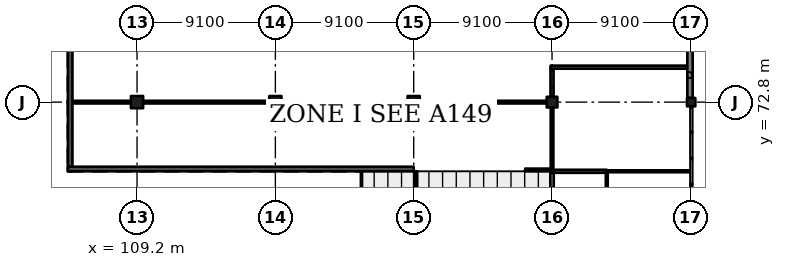
"""IFC4 building model, lengths in metres.
Left out: names, types, materials, properties, quantities, classifications, styles, units other than length and angle.
Written with IfcOpenShell. Run it as: python <this file> out.ifc"""

import sys

from ifc_helpers import new_model, si_unit, direction, frame, frame_2d, origin, origin_2d, place, context, subcontext, project, spatial, rectangle, extrude, element, fill, save


model = new_model("IFC4")
c1 = context("Model", 3, precision=1e-05, world=origin(), true_north=direction((0.0, 1.0)))
c2 = subcontext(c1, "Body", "Model", "MODEL_VIEW")
j1 = project(units=[si_unit("LENGTHUNIT", "METRE"), si_unit("PLANEANGLEUNIT", "RADIAN")], contexts=[c1])
p1 = place(None, origin())
s1 = spatial("IfcSite", under=j1, at=p1, CompositionType="ELEMENT")
p2 = place(p1, origin())
s2 = spatial("IfcBuilding", under=s1, at=p2, CompositionType="ELEMENT")
p3 = place(p2, frame((0.0, 0.0, 15.47)))
s3 = spatial("IfcBuildingStorey", under=s2, at=p3, CompositionType="ELEMENT", Elevation=15.47)
for number, where, z_axis, x_axis in (
    (1, (109.2, 72.8, 0.0), (0.0, 0.0, 1.0), (1.0, 0.0, 0.0)),
    (2, (118.3, 72.8, 0.0), (0.0, 0.0, 1.0), (1.0, 0.0, 0.0)),
    (3, (127.4, 72.8, 0.0), (0.0, 0.0, 1.0), (1.0, 0.0, 0.0)),
):
    element("IfcColumn", number, at=place(p3, frame(where, z_axis=z_axis, x_axis=x_axis)), inside=s3, PredefinedType="COLUMN", context=c2, shape_type="SweptSolid", body=[
        extrude(rectangle(XDim=0.8, YDim=0.8, at=origin_2d()), origin(), (0.0, 0.0, 1.0), 4.55),
    ])
p4 = place(p3, frame((136.5, 72.8, 0.0), z_axis=(0.0, 0.0, 1.0), x_axis=(1.0, 0.0, 0.0)))
e4 = element("IfcColumn", 4, at=p4, inside=s3, PredefinedType="COLUMN", context=c2, shape_type="SweptSolid", body=[
    extrude(rectangle(XDim=0.7, YDim=0.7, at=origin_2d()), origin(), (0.0, 0.0, 1.0), 4.55),
])
p5 = place(p3, frame((145.65, 72.8, 0.0), z_axis=(0.0, 0.0, 1.0), x_axis=(1.0, 0.0, 0.0)))
e5 = element("IfcColumn", 5, at=p5, inside=s3, PredefinedType="COLUMN", context=c2, shape_type="SweptSolid", body=[
    extrude(rectangle(XDim=0.55, YDim=0.55, at=origin_2d()), origin(), (0.0, 0.0, 1.0), 4.55),
])
for number, where, z_axis, x_axis in (
    (6, (104.8, 68.25, 0.0), (0.0, 0.0, 1.0), (0.0, 1.0, 0.0)),
    (7, (104.65, 68.4, 0.0), (0.0, 0.0, 1.0), (1.0, 0.0, 0.0)),
):
    element("IfcWall", number, at=place(p3, frame(where, z_axis=z_axis, x_axis=x_axis)), inside=s3, PredefinedType="SHEAR", context=c2, shape_type="SweptSolid", body=[
        extrude(rectangle(XDim=22.75, YDim=0.3, at=frame_2d((11.375, 0.0))), origin(), (0.0, 0.0, 1.0), 4.55),
    ])
p6 = place(p3, frame((145.575, 73.075, 0.0), z_axis=(0.0, 0.0, 1.0), x_axis=(0.0, 1.0, 0.0)))
e8 = element("IfcWall", 8, at=p6, inside=s3, PredefinedType="SOLIDWALL", context=c2, shape_type="SweptSolid", body=[
    extrude(rectangle(XDim=8.575, YDim=0.35, at=frame_2d((4.288, 0.0))), origin(), (0.0, 0.0, 1.0), 3.55),
])
p7 = place(p3, frame((104.95, 72.8, 0.0), z_axis=(0.0, 0.0, 1.0), x_axis=(1.0, 0.0, 0.0)))
e9 = element("IfcWall", 9, at=p7, inside=s3, PredefinedType="PARTITIONING", context=c2, shape_type="SweptSolid", body=[
    extrude(rectangle(XDim=3.85, YDim=0.175, at=frame_2d((1.925, 0.0))), origin(), (0.0, 0.0, 1.0), 4.3),
])
p8 = place(p3, frame((109.6, 72.8, 0.0), z_axis=(0.0, 0.0, 1.0), x_axis=(1.0, 0.0, 0.0)))
e10 = element("IfcWall", 10, at=p8, inside=s3, PredefinedType="PARTITIONING", context=c2, shape_type="SweptSolid", body=[
    extrude(rectangle(XDim=8.3, YDim=0.175, at=frame_2d((4.15, 0.0))), origin(), (0.0, 0.0, 1.0), 3.6),
])
p9 = place(p3, frame((118.7, 72.8, 0.0), z_axis=(0.0, 0.0, 1.0), x_axis=(1.0, 0.0, 0.0)))
e11 = element("IfcWall", 11, at=p9, inside=s3, PredefinedType="PARTITIONING", context=c2, shape_type="SweptSolid", body=[
    extrude(rectangle(XDim=8.3, YDim=0.175, at=frame_2d((4.15, 0.0))), origin(), (0.0, 0.0, 1.0), 3.6),
])
p10 = place(p3, frame((127.8, 72.8, 0.0), z_axis=(0.0, 0.0, 1.0), x_axis=(1.0, 0.0, 0.0)))
e12 = element("IfcWall", 12, at=p10, inside=s3, PredefinedType="PARTITIONING", context=c2, shape_type="SweptSolid", body=[
    extrude(rectangle(XDim=8.35, YDim=0.175, at=frame_2d((4.175, 0.0))), origin(), (0.0, 0.0, 1.0), 3.6),
])
p11 = place(p10, frame((3.65, 0.0, 0.0)))
e13 = element("IfcOpeningElement", 13, at=p11, cuts=e12, PredefinedType="OPENING", context=c2, shape_type="SweptSolid", body=[
    extrude(rectangle(XDim=1.1, YDim=2.4, at=frame_2d((0.55, 1.2))), frame((0.0, 0.097, 0.0), z_axis=(0.0, -1.0, 0.0), x_axis=(1.0, 0.0, 0.0)), (0.0, 0.0, 1.0), 0.195),
])
p12 = place(p3, frame((136.5, 64.025, 0.0), z_axis=(0.0, 0.0, 1.0), x_axis=(0.0, 1.0, 0.0)))
e14 = element("IfcWall", 14, at=p12, inside=s3, PredefinedType="PARTITIONING", context=c2, shape_type="SweptSolid", body=[
    extrude(rectangle(XDim=4.125, YDim=0.225, at=frame_2d((2.062, 0.0))), origin(), (0.0, 0.0, 1.0), 3.55),
])
p13 = place(p3, frame((136.5, 68.338, 0.0), z_axis=(0.0, 0.0, 1.0), x_axis=(-1.0, 0.0, 0.0)))
e15 = element("IfcWall", 15, at=p13, inside=s3, PredefinedType="PARTITIONING", context=c2, shape_type="SweptSolid", body=[
    extrude(rectangle(XDim=1.77, YDim=0.175, at=frame_2d((0.885, 0.0))), origin(), (0.0, 0.0, 1.0), 4.3),
])
p14 = place(p3, frame((136.5, 72.45, 0.0), z_axis=(0.0, 0.0, 1.0), x_axis=(0.0, -1.0, 0.0)))
e16 = element("IfcWall", 16, at=p14, inside=s3, PredefinedType="PARTITIONING", context=c2, shape_type="SweptSolid", body=[
    extrude(rectangle(XDim=4.1, YDim=0.175, at=frame_2d((2.05, 0.0))), origin(), (0.0, 0.0, 1.0), 3.55),
])
p15 = place(p3, frame((136.5, 75.0, 0.0), z_axis=(0.0, 0.0, 1.0), x_axis=(0.0, -1.0, 0.0)))
e17 = element("IfcWall", 17, at=p15, inside=s3, PredefinedType="PARTITIONING", context=c2, shape_type="SweptSolid", body=[
    extrude(rectangle(XDim=1.85, YDim=0.2, at=frame_2d((0.925, 0.0))), origin(), (0.0, 0.0, 1.0), 3.55),
])
p16 = place(p3, frame((140.1, 54.6, 0.0), z_axis=(0.0, 0.0, 1.0), x_axis=(0.0, 1.0, 0.0)))
e18 = element("IfcWall", 18, at=p16, inside=s3, PredefinedType="PARTITIONING", context=c2, shape_type="SweptSolid", body=[
    extrude(rectangle(XDim=13.55, YDim=0.125, at=frame_2d((6.775, 0.0))), origin(), (0.0, 0.0, 1.0), 4.3),
])
p17 = place(p16, frame((4.05, 0.0, 0.0)))
e19 = element("IfcOpeningElement", 19, at=p17, cuts=e18, PredefinedType="OPENING", context=c2, shape_type="SweptSolid", body=[
    extrude(rectangle(XDim=1.0, YDim=2.1, at=frame_2d((0.5, 1.05))), frame((0.0, 0.073, 0.0), z_axis=(0.0, -1.0, 0.0), x_axis=(1.0, 0.0, 0.0)), (0.0, 0.0, 1.0), 0.145),
])
p18 = place(p16, frame((10.8, 0.0, 0.0)))
e20 = element("IfcOpeningElement", 20, at=p18, cuts=e18, PredefinedType="OPENING", context=c2, shape_type="SweptSolid", body=[
    extrude(rectangle(XDim=1.0, YDim=2.1, at=frame_2d((0.5, 1.05))), frame((0.0, 0.073, 0.0), z_axis=(0.0, -1.0, 0.0), x_axis=(1.0, 0.0, 0.0)), (0.0, 0.0, 1.0), 0.145),
])
p19 = place(p3, frame((140.1, 68.25, 0.0), z_axis=(0.0, 0.0, 1.0), x_axis=(-1.0, 0.0, 0.0)))
e21 = element("IfcWall", 21, at=p19, inside=s3, PredefinedType="PARTITIONING", context=c2, shape_type="SweptSolid", body=[
    extrude(rectangle(XDim=3.6, YDim=0.2, at=frame_2d((1.8, 0.0))), origin(), (0.0, 0.0, 1.0), 4.3),
])
p20 = place(p19, frame((0.55, 0.0, 0.0)))
e22 = element("IfcOpeningElement", 22, at=p20, cuts=e21, PredefinedType="OPENING", context=c2, shape_type="SweptSolid", body=[
    extrude(rectangle(XDim=2.4, YDim=2.4, at=frame_2d((1.2, 1.2))), frame((0.0, 0.11, 0.0), z_axis=(0.0, -1.0, 0.0), x_axis=(1.0, 0.0, 0.0)), (0.0, 0.0, 1.0), 0.22),
])
p21 = place(p3, frame((145.4, 75.1, 0.0), z_axis=(0.0, 0.0, 1.0), x_axis=(-1.0, 0.0, 0.0)))
e23 = element("IfcWall", 23, at=p21, inside=s3, PredefinedType="PARTITIONING", context=c2, shape_type="SweptSolid", body=[
    extrude(rectangle(XDim=9.0, YDim=0.2, at=frame_2d((4.5, 0.0))), origin(), (0.0, 0.0, 1.0), 4.3),
])
p22 = place(p21, frame((1.05, 0.0, 0.0)))
e24 = element("IfcOpeningElement", 24, at=p22, cuts=e23, PredefinedType="OPENING", context=c2, shape_type="SweptSolid", body=[
    extrude(rectangle(XDim=2.4, YDim=2.4, at=frame_2d((1.2, 1.2))), frame((0.0, 0.11, 0.0), z_axis=(0.0, -1.0, 0.0), x_axis=(1.0, 0.0, 0.0)), (0.0, 0.0, 1.0), 0.22),
])
p23 = place(p21, frame((5.55, 0.0, 0.0)))
e25 = element("IfcOpeningElement", 25, at=p23, cuts=e23, PredefinedType="OPENING", context=c2, shape_type="SweptSolid", body=[
    extrude(rectangle(XDim=2.4, YDim=2.4, at=frame_2d((1.2, 1.2))), frame((0.0, 0.11, 0.0), z_axis=(0.0, -1.0, 0.0), x_axis=(1.0, 0.0, 0.0)), (0.0, 0.0, 1.0), 0.22),
])
p24 = place(p3, frame((145.57, 68.25, 0.0), z_axis=(0.0, 0.0, 1.0), x_axis=(-1.0, 0.0, 0.0)))
e26 = element("IfcWall", 26, at=p24, inside=s3, PredefinedType="PARTITIONING", context=c2, shape_type="SweptSolid", body=[
    extrude(rectangle(XDim=5.47, YDim=0.125, at=frame_2d((2.735, 0.0))), origin(), (0.0, 0.0, 1.0), 4.3),
])
p25 = place(p3, frame((127.53, 64.0, 0.0), z_axis=(0.0, 0.0, 1.0), x_axis=(0.0, 1.0, 0.0)))
e27 = element("IfcWall", 27, at=p25, inside=s3, PredefinedType="PARTITIONING", context=c2, shape_type="SweptSolid", body=[
    extrude(rectangle(XDim=4.25, YDim=0.2, at=frame_2d((2.125, 0.0))), origin(), (0.0, 0.0, 1.0), 2.91),
])
p26 = place(p25, frame((1.125, 0.0, 1.1)))
e28 = element("IfcOpeningElement", 28, at=p26, cuts=e27, PredefinedType="OPENING", context=c2, shape_type="SweptSolid", body=[
    extrude(rectangle(XDim=2.0, YDim=1.3, at=frame_2d((1.0, 0.65))), frame((0.0, 0.11, 0.0), z_axis=(0.0, -1.0, 0.0), x_axis=(1.0, 0.0, 0.0)), (0.0, 0.0, 1.0), 0.22),
])
p27 = place(p11, origin())
e29 = element("IfcDoor", 29, at=p27, inside=s3, OperationType="SINGLE_SWING_RIGHT", PredefinedType="DOOR", context=c2, shape_type="SweptSolid", body=[
    extrude(rectangle(XDim=1.1, YDim=2.4, at=frame_2d((0.55, 1.2))), frame((0.0, 0.025, 0.0), z_axis=(0.0, -1.0, 0.0), x_axis=(1.0, 0.0, 0.0)), (0.0, 0.0, 1.0), 0.05),
])
fill(e13, e29)
p28 = place(p22, origin())
e30 = element("IfcDoor", 30, at=p28, inside=s3, OperationType="DOUBLE_DOOR_SINGLE_SWING", PredefinedType="DOOR", context=c2, shape_type="SweptSolid", body=[
    extrude(rectangle(XDim=2.4, YDim=2.4, at=frame_2d((1.2, 1.2))), frame((0.0, 0.025, 0.0), z_axis=(0.0, -1.0, 0.0), x_axis=(1.0, 0.0, 0.0)), (0.0, 0.0, 1.0), 0.05),
])
fill(e24, e30)
p29 = place(p23, origin())
e31 = element("IfcDoor", 31, at=p29, inside=s3, OperationType="DOUBLE_DOOR_SINGLE_SWING", PredefinedType="DOOR", context=c2, shape_type="SweptSolid", body=[
    extrude(rectangle(XDim=2.4, YDim=2.4, at=frame_2d((1.2, 1.2))), frame((0.0, 0.025, 0.0), z_axis=(0.0, -1.0, 0.0), x_axis=(1.0, 0.0, 0.0)), (0.0, 0.0, 1.0), 0.05),
])
fill(e25, e31)
p30 = place(p20, origin())
e32 = element("IfcDoor", 32, at=p30, inside=s3, OperationType="DOUBLE_DOOR_SINGLE_SWING", PredefinedType="DOOR", context=c2, shape_type="SweptSolid", body=[
    extrude(rectangle(XDim=2.4, YDim=2.4, at=frame_2d((1.2, 1.2))), frame((0.0, 0.025, 0.0), z_axis=(0.0, -1.0, 0.0), x_axis=(1.0, 0.0, 0.0)), (0.0, 0.0, 1.0), 0.05),
])
fill(e22, e32)
save(model, sys.argv[1])
